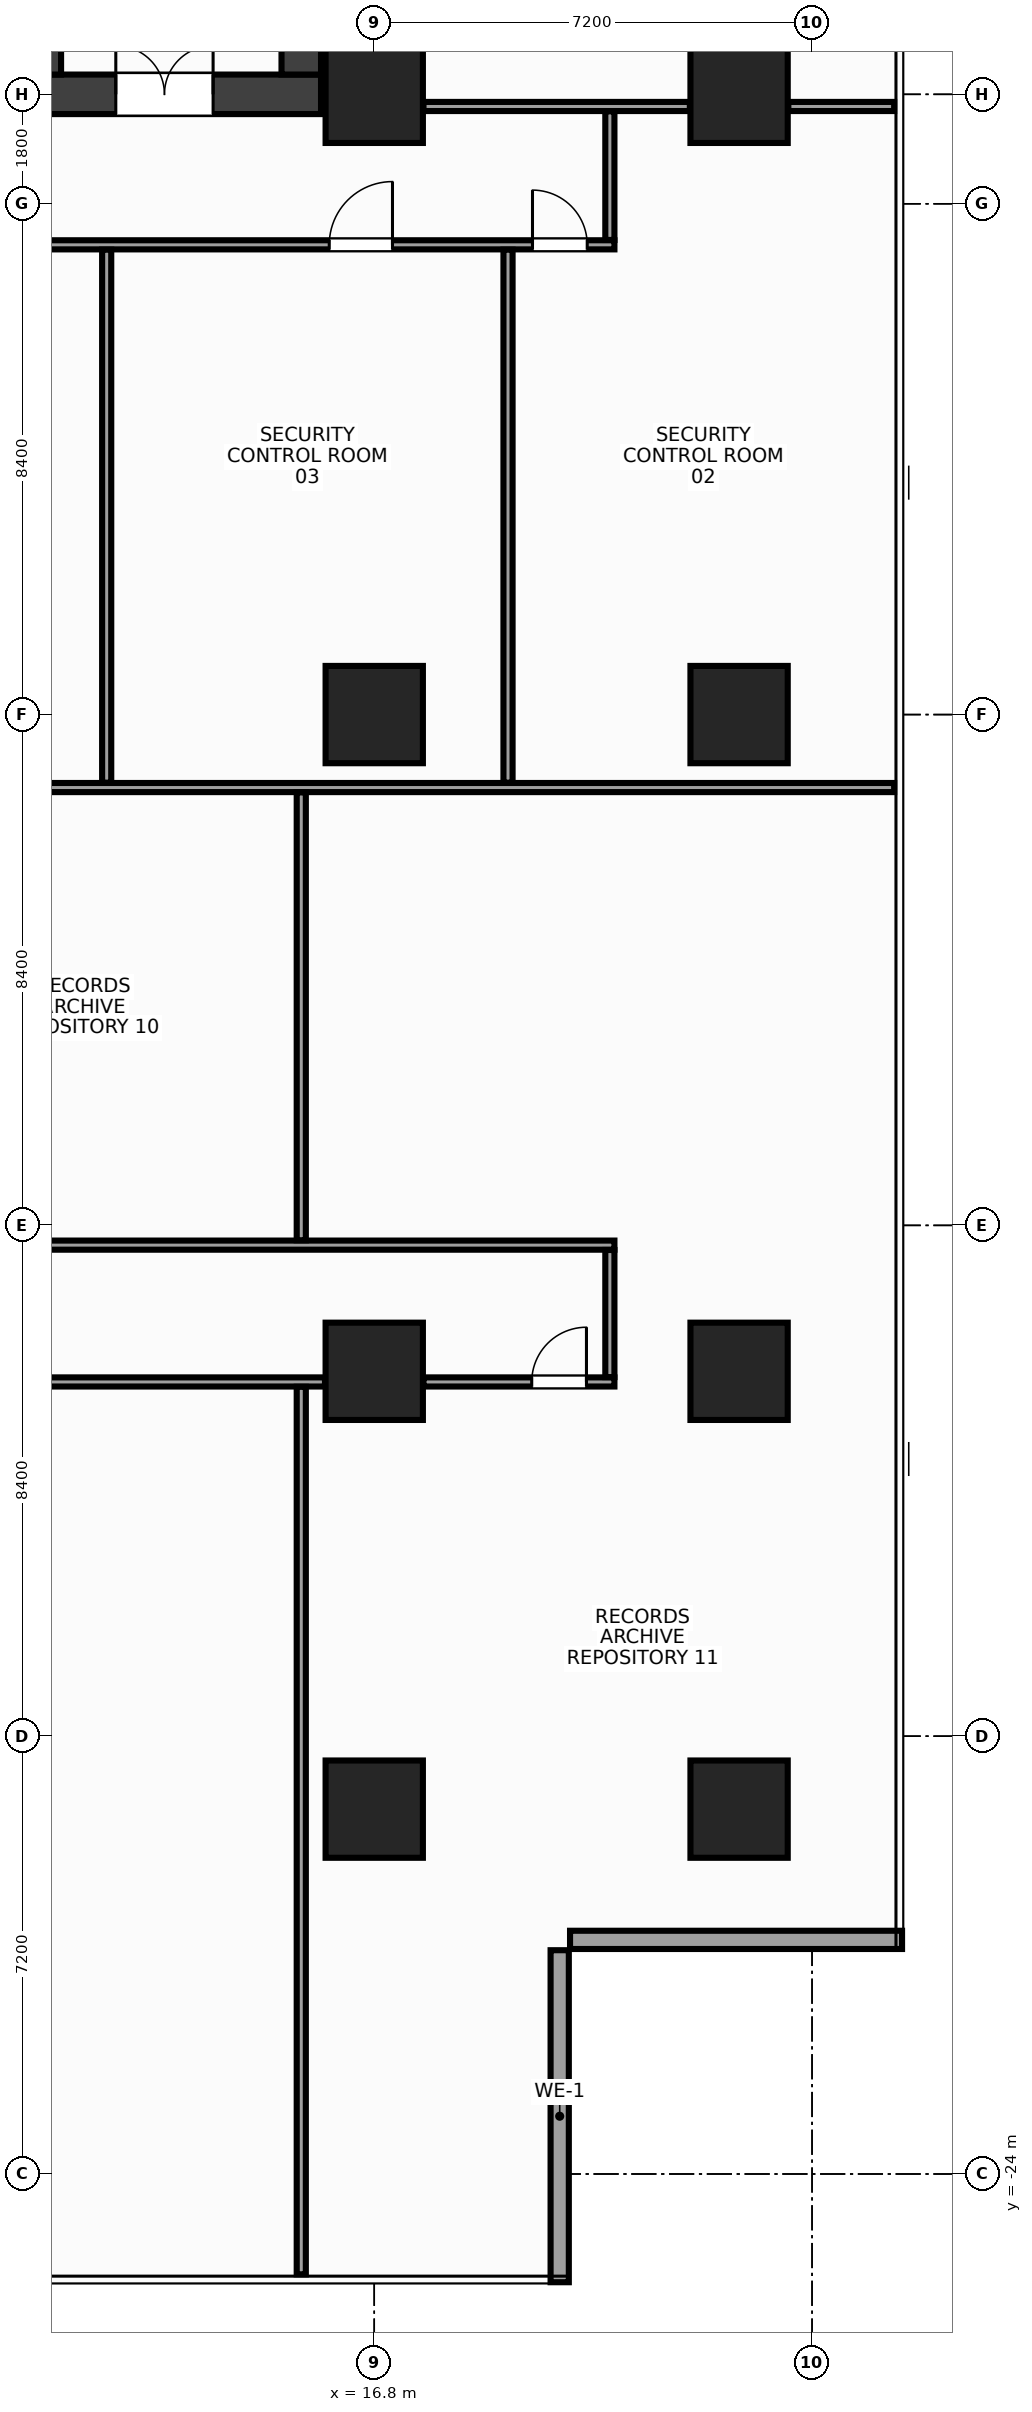
"""IFC4 building model, lengths in metres.
Left out: names, types, materials, properties, quantities, classifications, styles, units other than length and angle.
Written with IfcOpenShell. Run it as: python <this file> out.ifc"""

import sys

from ifc_helpers import new_model, si_unit, direction, frame, frame_2d, origin, origin_2d, place, context, subcontext, project, spatial, rectangle, extrude, source, transform, mapped, element, fill, save


model = new_model("IFC4")
c1 = context("Model", 3, precision=1e-05, world=origin(), true_north=direction((0.0, 1.0)))
c2 = subcontext(c1, "Body", "Model", "MODEL_VIEW")
j1 = project(units=[si_unit("LENGTHUNIT", "METRE"), si_unit("PLANEANGLEUNIT", "RADIAN")], contexts=[c1])
p1 = place(None, origin())
s1 = spatial("IfcSite", under=j1, at=p1, CompositionType="ELEMENT")
p2 = place(p1, origin())
s2 = spatial("IfcBuilding", under=s1, at=p2, CompositionType="ELEMENT")
p3 = place(p2, frame((0.0, 0.0, 99.2)))
s3 = spatial("IfcBuildingStorey", under=s2, at=p3, CompositionType="ELEMENT", Elevation=99.2)
m1 = source(origin(), c2, "Body", "SweptSolid", [
    extrude(rectangle(XDim=31.85, YDim=0.65, at=frame_2d((15.925, 0.0))), origin(), (0.0, 0.0, 1.0), 3.6),
])
p4 = place(p3, frame((-15.925, 10.2, 0.0), z_axis=(0.0, 0.0, 1.0), x_axis=(1.0, 0.0, 0.0)))
e1 = element("IfcWall", 1, at=p4, inside=s3, PredefinedType="SHEAR", context=c2, shape_type="MappedRepresentation", body=[
    mapped(m1, transform((0.0, 0.0, 0.0), x_axis=(1.0, 0.0, 0.0), y_axis=(0.0, 1.0, 0.0), z_axis=(0.0, 0.0, 1.0), scale=1.0)),
])
p5 = place(p4, frame((1.775, 0.0, 0.0)))
e2 = element("IfcOpeningElement", 2, at=p5, cuts=e1, PredefinedType="OPENING", context=c2, shape_type="SweptSolid", body=[
    extrude(rectangle(XDim=1.6, YDim=2.15, at=frame_2d((0.8, 1.075))), frame((0.0, 0.337, 0.0), z_axis=(0.0, -1.0, 0.0), x_axis=(1.0, 0.0, 0.0)), (0.0, 0.0, 1.0), 0.674),
])
p6 = place(p4, frame((28.475, 0.0, 0.0)))
e3 = element("IfcOpeningElement", 3, at=p6, cuts=e1, PredefinedType="OPENING", context=c2, shape_type="SweptSolid", body=[
    extrude(rectangle(XDim=1.6, YDim=2.15, at=frame_2d((0.8, 1.075))), frame((0.0, 0.337, 0.0), z_axis=(0.0, -1.0, 0.0), x_axis=(1.0, 0.0, 0.0)), (0.0, 0.0, 1.0), 0.674),
])
p7 = place(p4, frame((15.175, 0.0, 0.0)))
e4 = element("IfcOpeningElement", 4, at=p7, cuts=e1, PredefinedType="OPENING", context=c2, shape_type="SweptSolid", body=[
    extrude(rectangle(XDim=1.5, YDim=2.2, at=frame_2d((0.75, 1.1))), frame((0.0, 0.337, 0.0), z_axis=(0.0, -1.0, 0.0), x_axis=(1.0, 0.0, 0.0)), (0.0, 0.0, 1.0), 0.674),
])
m2 = source(origin(), c2, "Body", "SweptSolid", [
    extrude(rectangle(XDim=12.95, YDim=0.65, at=frame_2d((6.475, 0.0))), origin(), (0.0, 0.0, 1.0), 3.6),
])
p8 = place(p3, frame((15.6, 10.525, 0.0), z_axis=(0.0, 0.0, 1.0), x_axis=(0.0, 1.0, 0.0)))
e5 = element("IfcWall", 5, at=p8, inside=s3, PredefinedType="SHEAR", context=c2, shape_type="MappedRepresentation", body=[
    mapped(m2, transform((0.0, 0.0, 0.0), x_axis=(1.0, 0.0, 0.0), y_axis=(0.0, 1.0, 0.0), z_axis=(0.0, 0.0, 1.0), scale=1.0)),
])
m3 = source(origin(), c2, "Body", "SweptSolid", [
    extrude(rectangle(XDim=3.125, YDim=0.2, at=frame_2d((1.562, 0.0))), origin(), (0.0, 0.0, 1.0), 3.6),
])
p9 = place(p3, frame((11.55, 10.525, 0.0), z_axis=(0.0, 0.0, 1.0), x_axis=(0.0, 1.0, 0.0)))
e6 = element("IfcWall", 6, at=p9, inside=s3, PredefinedType="SHEAR", context=c2, shape_type="MappedRepresentation", body=[
    mapped(m3, transform((0.0, 0.0, 0.0), x_axis=(1.0, 0.0, 0.0), y_axis=(0.0, 1.0, 0.0), z_axis=(0.0, 0.0, 1.0), scale=1.0)),
])
p10 = place(p9, frame((0.9, 0.0, 0.0)))
e7 = element("IfcOpeningElement", 7, at=p10, cuts=e6, PredefinedType="OPENING", context=c2, shape_type="SweptSolid", body=[
    extrude(rectangle(XDim=1.1, YDim=2.15, at=frame_2d((0.55, 1.075))), frame((0.0, 0.112, 0.0), z_axis=(0.0, -1.0, 0.0), x_axis=(1.0, 0.0, 0.0)), (0.0, 0.0, 1.0), 0.224),
])
m4 = source(origin(), c2, "Body", "SweptSolid", [
    extrude(rectangle(XDim=1.6, YDim=1.6, at=origin_2d()), origin(), (0.0, 0.0, 1.0), 3.6),
])
for number, where, z_axis, x_axis in (
    (8, (16.8, -18.0, 0.0), (0.0, 0.0, 1.0), (1.0, 0.0, 0.0)),
    (9, (16.8, -10.8, 0.0), (0.0, 0.0, 1.0), (1.0, 0.0, 0.0)),
    (10, (16.8, 0.0, 0.0), (0.0, 0.0, 1.0), (1.0, 0.0, 0.0)),
    (11, (16.8, 10.2, 0.0), (0.0, 0.0, 1.0), (1.0, 0.0, 0.0)),
    (12, (22.8, -18.0, 0.0), (0.0, 0.0, 1.0), (1.0, 0.0, 0.0)),
    (13, (22.8, -10.8, 0.0), (0.0, 0.0, 1.0), (1.0, 0.0, 0.0)),
    (14, (22.8, 0.0, 0.0), (0.0, 0.0, 1.0), (1.0, 0.0, 0.0)),
    (15, (22.8, 10.2, 0.0), (0.0, 0.0, 1.0), (1.0, 0.0, 0.0)),
):
    element("IfcColumn", number, at=place(p3, frame(where, z_axis=z_axis, x_axis=x_axis)), inside=s3, PredefinedType="COLUMN", context=c2, shape_type="MappedRepresentation", body=[
        mapped(m4, transform((0.0, 0.0, 0.0), x_axis=(1.0, 0.0, 0.0), y_axis=(0.0, 1.0, 0.0), z_axis=(0.0, 0.0, 1.0), scale=1.0)),
    ])
m5 = source(origin(), c2, "Body", "SweptSolid", [
    extrude(rectangle(XDim=5.46, YDim=0.3, at=frame_2d((2.73, 0.0))), origin(), (0.0, 0.0, 1.0), 2.74),
])
for number, where, z_axis, x_axis in (
    (16, (19.85, -25.78, 0.0), (0.0, 0.0, 1.0), (0.0, 1.0, 0.0)),
    (17, (20.02, -20.15, 0.0), (0.0, 0.0, 1.0), (1.0, 0.0, 0.0)),
):
    element("IfcWall", number, at=place(p3, frame(where, z_axis=z_axis, x_axis=x_axis)), inside=s3, PredefinedType="STANDARD", context=c2, shape_type="MappedRepresentation", body=[
        mapped(m5, transform((0.0, 0.0, 0.0), x_axis=(1.0, 0.0, 0.0), y_axis=(0.0, 1.0, 0.0), z_axis=(0.0, 0.0, 1.0), scale=1.0)),
    ])
m6 = source(origin(), c2, "Body", "SweptSolid", [
    extrude(rectangle(XDim=4.38, YDim=0.15, at=frame_2d((2.19, 0.0))), origin(), (0.0, 0.0, 1.0), 2.745),
])
p11 = place(p3, frame((17.61, 10.0, 0.0), z_axis=(0.0, 0.0, 1.0), x_axis=(1.0, 0.0, 0.0)))
e18 = element("IfcWall", 18, at=p11, inside=s3, PredefinedType="PARTITIONING", context=c2, shape_type="MappedRepresentation", body=[
    mapped(m6, transform((0.0, 0.0, 0.0), x_axis=(1.0, 0.0, 0.0), y_axis=(0.0, 1.0, 0.0), z_axis=(0.0, 0.0, 1.0), scale=1.0)),
])
m7 = source(origin(), c2, "Body", "SweptSolid", [
    extrude(rectangle(XDim=1.74, YDim=0.15, at=frame_2d((0.87, 0.0))), origin(), (0.0, 0.0, 1.0), 3.36),
])
p12 = place(p3, frame((23.61, 10.0, 0.0), z_axis=(0.0, 0.0, 1.0), x_axis=(1.0, 0.0, 0.0)))
e19 = element("IfcWall", 19, at=p12, inside=s3, PredefinedType="PARTITIONING", context=c2, shape_type="MappedRepresentation", body=[
    mapped(m7, transform((0.0, 0.0, 0.0), x_axis=(1.0, 0.0, 0.0), y_axis=(0.0, 1.0, 0.0), z_axis=(0.0, 0.0, 1.0), scale=1.0)),
])
m8 = source(origin(), c2, "Body", "SweptSolid", [
    extrude(rectangle(XDim=22.3, YDim=0.15, at=frame_2d((11.15, 0.0))), origin(), (0.0, 0.0, 1.0), 2.745),
])
p13 = place(p3, frame((-1.55, 7.725, 0.0), z_axis=(0.0, 0.0, 1.0), x_axis=(1.0, 0.0, 0.0)))
e20 = element("IfcWall", 20, at=p13, inside=s3, PredefinedType="PARTITIONING", context=c2, shape_type="MappedRepresentation", body=[
    mapped(m8, transform((0.0, 0.0, 0.0), x_axis=(1.0, 0.0, 0.0), y_axis=(0.0, 1.0, 0.0), z_axis=(0.0, 0.0, 1.0), scale=1.0)),
])
p14 = place(p13, frame((20.952, 0.0, 0.0)))
e21 = element("IfcOpeningElement", 21, at=p14, cuts=e20, PredefinedType="OPENING", context=c2, shape_type="SweptSolid", body=[
    extrude(rectangle(XDim=0.9, YDim=2.15, at=frame_2d((0.45, 1.075))), frame((0.0, 0.087, 0.0), z_axis=(0.0, -1.0, 0.0), x_axis=(1.0, 0.0, 0.0)), (0.0, 0.0, 1.0), 0.174),
])
p15 = place(p13, frame((17.61, 0.0, 0.0)))
e22 = element("IfcOpeningElement", 22, at=p15, cuts=e20, PredefinedType="OPENING", context=c2, shape_type="SweptSolid", body=[
    extrude(rectangle(XDim=1.04, YDim=2.2, at=frame_2d((0.52, 1.1))), frame((0.0, 0.087, 0.0), z_axis=(0.0, -1.0, 0.0), x_axis=(1.0, 0.0, 0.0)), (0.0, 0.0, 1.0), 0.174),
])
p16 = place(p13, frame((2.677, 0.0, 0.0)))
e23 = element("IfcOpeningElement", 23, at=p16, cuts=e20, PredefinedType="OPENING", context=c2, shape_type="SweptSolid", body=[
    extrude(rectangle(XDim=1.04, YDim=2.2, at=frame_2d((0.52, 1.1))), frame((0.0, 0.087, 0.0), z_axis=(0.0, -1.0, 0.0), x_axis=(1.0, 0.0, 0.0)), (0.0, 0.0, 1.0), 0.174),
])
p17 = place(p13, frame((9.63, 0.0, 0.0)))
e24 = element("IfcOpeningElement", 24, at=p17, cuts=e20, PredefinedType="OPENING", context=c2, shape_type="SweptSolid", body=[
    extrude(rectangle(XDim=1.04, YDim=2.2, at=frame_2d((0.52, 1.1))), frame((0.0, 0.087, 0.0), z_axis=(0.0, -1.0, 0.0), x_axis=(1.0, 0.0, 0.0)), (0.0, 0.0, 1.0), 0.174),
])
p18 = place(p3, frame((-1.55, -8.725, 0.0), z_axis=(0.0, 0.0, 1.0), x_axis=(1.0, 0.0, 0.0)))
e25 = element("IfcWall", 25, at=p18, inside=s3, PredefinedType="PARTITIONING", context=c2, shape_type="MappedRepresentation", body=[
    mapped(m8, transform((0.0, 0.0, 0.0), x_axis=(1.0, 0.0, 0.0), y_axis=(0.0, 1.0, 0.0), z_axis=(0.0, 0.0, 1.0), scale=1.0)),
])
p19 = place(p18, frame((1.897, 0.0, 0.0)))
e26 = element("IfcOpeningElement", 26, at=p19, cuts=e25, PredefinedType="OPENING", context=c2, shape_type="SweptSolid", body=[
    extrude(rectangle(XDim=1.04, YDim=2.2, at=frame_2d((0.52, 1.1))), frame((0.0, 0.087, 0.0), z_axis=(0.0, -1.0, 0.0), x_axis=(1.0, 0.0, 0.0)), (0.0, 0.0, 1.0), 0.174),
])
p20 = place(p18, frame((10.23, 0.0, 0.0)))
e27 = element("IfcOpeningElement", 27, at=p20, cuts=e25, PredefinedType="OPENING", context=c2, shape_type="SweptSolid", body=[
    extrude(rectangle(XDim=1.04, YDim=2.2, at=frame_2d((0.52, 1.1))), frame((0.0, 0.087, 0.0), z_axis=(0.0, -1.0, 0.0), x_axis=(1.0, 0.0, 0.0)), (0.0, 0.0, 1.0), 0.174),
])
m9 = source(origin(), c2, "Body", "SweptSolid", [
    extrude(rectangle(XDim=7.08, YDim=0.15, at=frame_2d((3.54, 0.0))), origin(), (0.0, 0.0, 1.0), 2.745),
])
p21 = place(p3, frame((8.91, -10.975, 0.0), z_axis=(0.0, 0.0, 1.0), x_axis=(1.0, 0.0, 0.0)))
e28 = element("IfcWall", 28, at=p21, inside=s3, PredefinedType="PARTITIONING", context=c2, shape_type="MappedRepresentation", body=[
    mapped(m9, transform((0.0, 0.0, 0.0), x_axis=(1.0, 0.0, 0.0), y_axis=(0.0, 1.0, 0.0), z_axis=(0.0, 0.0, 1.0), scale=1.0)),
])
m10 = source(origin(), c2, "Body", "SweptSolid", [
    extrude(rectangle(XDim=3.14, YDim=0.15, at=frame_2d((1.57, 0.0))), origin(), (0.0, 0.0, 1.0), 2.745),
])
p22 = place(p3, frame((17.61, -10.975, 0.0), z_axis=(0.0, 0.0, 1.0), x_axis=(1.0, 0.0, 0.0)))
e29 = element("IfcWall", 29, at=p22, inside=s3, PredefinedType="PARTITIONING", context=c2, shape_type="MappedRepresentation", body=[
    mapped(m10, transform((0.0, 0.0, 0.0), x_axis=(1.0, 0.0, 0.0), y_axis=(0.0, 1.0, 0.0), z_axis=(0.0, 0.0, 1.0), scale=1.0)),
])
p23 = place(p22, frame((1.78, 0.0, 0.0)))
e30 = element("IfcOpeningElement", 30, at=p23, cuts=e29, PredefinedType="OPENING", context=c2, shape_type="SweptSolid", body=[
    extrude(rectangle(XDim=0.9, YDim=2.15, at=frame_2d((0.45, 1.075))), frame((0.0, 0.087, 0.0), z_axis=(0.0, -1.0, 0.0), x_axis=(1.0, 0.0, 0.0)), (0.0, 0.0, 1.0), 0.174),
])
m11 = source(origin(), c2, "Body", "SweptSolid", [
    extrude(rectangle(XDim=2.115, YDim=0.15, at=frame_2d((1.058, 0.0))), origin(), (0.0, 0.0, 1.0), 3.36),
])
p24 = place(p3, frame((20.675, 7.805, 0.0), z_axis=(0.0, 0.0, 1.0), x_axis=(0.0, 1.0, 0.0)))
e31 = element("IfcWall", 31, at=p24, inside=s3, PredefinedType="PARTITIONING", context=c2, shape_type="MappedRepresentation", body=[
    mapped(m11, transform((0.0, 0.0, 0.0), x_axis=(1.0, 0.0, 0.0), y_axis=(0.0, 1.0, 0.0), z_axis=(0.0, 0.0, 1.0), scale=1.0)),
])
m12 = source(origin(), c2, "Body", "SweptSolid", [
    extrude(rectangle(XDim=2.09, YDim=0.15, at=frame_2d((1.045, 0.0))), origin(), (0.0, 0.0, 1.0), 3.36),
])
p25 = place(p3, frame((20.675, -10.895, 0.0), z_axis=(0.0, 0.0, 1.0), x_axis=(0.0, 1.0, 0.0)))
e32 = element("IfcWall", 32, at=p25, inside=s3, PredefinedType="PARTITIONING", context=c2, shape_type="MappedRepresentation", body=[
    mapped(m12, transform((0.0, 0.0, 0.0), x_axis=(1.0, 0.0, 0.0), y_axis=(0.0, 1.0, 0.0), z_axis=(0.0, 0.0, 1.0), scale=1.0)),
])
m13 = source(origin(), c2, "Body", "SweptSolid", [
    extrude(rectangle(XDim=26.895, YDim=0.15, at=frame_2d((13.448, 0.0))), origin(), (0.0, 0.0, 1.0), 2.745),
])
p26 = place(p3, frame((-1.545, -1.2, 0.0), z_axis=(0.0, 0.0, 1.0), x_axis=(1.0, 0.0, 0.0)))
e33 = element("IfcWall", 33, at=p26, inside=s3, PredefinedType="PARTITIONING", context=c2, shape_type="MappedRepresentation", body=[
    mapped(m13, transform((0.0, 0.0, 0.0), x_axis=(1.0, 0.0, 0.0), y_axis=(0.0, 1.0, 0.0), z_axis=(0.0, 0.0, 1.0), scale=1.0)),
])
m14 = source(origin(), c2, "Body", "SweptSolid", [
    extrude(rectangle(XDim=8.765, YDim=0.15, at=frame_2d((4.383, 0.0))), origin(), (0.0, 0.0, 1.0), 2.645),
])
p27 = place(p3, frame((12.4, -1.12, 0.0), z_axis=(0.0, 0.0, 1.0), x_axis=(0.0, 1.0, 0.0)))
e34 = element("IfcWall", 34, at=p27, inside=s3, PredefinedType="PARTITIONING", context=c2, shape_type="MappedRepresentation", body=[
    mapped(m14, transform((0.0, 0.0, 0.0), x_axis=(1.0, 0.0, 0.0), y_axis=(0.0, 1.0, 0.0), z_axis=(0.0, 0.0, 1.0), scale=1.0)),
])
m15 = source(origin(), c2, "Body", "SweptSolid", [
    extrude(rectangle(XDim=8.765, YDim=0.15, at=frame_2d((4.383, 0.0))), origin(), (0.0, 0.0, 1.0), 2.745),
])
p28 = place(p3, frame((19.0, -1.12, 0.0), z_axis=(0.0, 0.0, 1.0), x_axis=(0.0, 1.0, 0.0)))
e35 = element("IfcWall", 35, at=p28, inside=s3, PredefinedType="PARTITIONING", context=c2, shape_type="MappedRepresentation", body=[
    mapped(m15, transform((0.0, 0.0, 0.0), x_axis=(1.0, 0.0, 0.0), y_axis=(0.0, 1.0, 0.0), z_axis=(0.0, 0.0, 1.0), scale=1.0)),
])
m16 = source(origin(), c2, "Body", "SweptSolid", [
    extrude(rectangle(XDim=14.595, YDim=0.15, at=frame_2d((7.297, 0.0))), origin(), (0.0, 0.0, 1.0), 2.745),
])
p29 = place(p3, frame((15.6, -25.65, 0.0), z_axis=(0.0, 0.0, 1.0), x_axis=(0.0, 1.0, 0.0)))
e36 = element("IfcWall", 36, at=p29, inside=s3, PredefinedType="PARTITIONING", context=c2, shape_type="MappedRepresentation", body=[
    mapped(m16, transform((0.0, 0.0, 0.0), x_axis=(1.0, 0.0, 0.0), y_axis=(0.0, 1.0, 0.0), z_axis=(0.0, 0.0, 1.0), scale=1.0)),
])
m17 = source(origin(), c2, "Body", "SweptSolid", [
    extrude(rectangle(XDim=7.365, YDim=0.15, at=frame_2d((3.683, 0.0))), origin(), (0.0, 0.0, 1.0), 3.36),
])
p30 = place(p3, frame((15.6, -8.645, 0.0), z_axis=(0.0, 0.0, 1.0), x_axis=(0.0, 1.0, 0.0)))
e37 = element("IfcWall", 37, at=p30, inside=s3, PredefinedType="PARTITIONING", context=c2, shape_type="MappedRepresentation", body=[
    mapped(m17, transform((0.0, 0.0, 0.0), x_axis=(1.0, 0.0, 0.0), y_axis=(0.0, 1.0, 0.0), z_axis=(0.0, 0.0, 1.0), scale=1.0)),
])
m18 = source(origin(), c2, "Body", "SweptSolid", [
    extrude(rectangle(XDim=1.6, YDim=2.15, at=frame_2d((0.8, 1.075))), frame((0.0, 0.025, 0.0), z_axis=(0.0, -1.0, 0.0), x_axis=(1.0, 0.0, 0.0)), (0.0, 0.0, 1.0), 0.05),
])
p31 = place(p6, origin())
e38 = element("IfcDoor", 38, at=p31, inside=s3, OperationType="DOUBLE_DOOR_SINGLE_SWING", PredefinedType="DOOR", context=c2, shape_type="MappedRepresentation", body=[
    mapped(m18, transform((0.0, 0.0, 0.0), x_axis=(1.0, 0.0, 0.0), y_axis=(0.0, 1.0, 0.0), z_axis=(0.0, 0.0, 1.0), scale=1.0)),
])
fill(e3, e38)
m19 = source(origin(), c2, "Body", "SweptSolid", [
    extrude(rectangle(XDim=0.9, YDim=2.15, at=frame_2d((0.45, 1.075))), frame((0.0, 0.025, 0.0), z_axis=(0.0, -1.0, 0.0), x_axis=(1.0, 0.0, 0.0)), (0.0, 0.0, 1.0), 0.05),
])
p32 = place(p14, origin())
e39 = element("IfcDoor", 39, at=p32, inside=s3, OperationType="SINGLE_SWING_LEFT", PredefinedType="DOOR", context=c2, shape_type="MappedRepresentation", body=[
    mapped(m19, transform((0.0, 0.0, 0.0), x_axis=(1.0, 0.0, 0.0), y_axis=(0.0, 1.0, 0.0), z_axis=(0.0, 0.0, 1.0), scale=1.0)),
])
fill(e21, e39)
m20 = source(origin(), c2, "Body", "SweptSolid", [
    extrude(rectangle(XDim=1.04, YDim=2.2, at=frame_2d((0.52, 1.1))), frame((0.0, 0.025, 0.0), z_axis=(0.0, -1.0, 0.0), x_axis=(1.0, 0.0, 0.0)), (0.0, 0.0, 1.0), 0.05),
])
p33 = place(p15, origin())
e40 = element("IfcDoor", 40, at=p33, inside=s3, OperationType="SINGLE_SWING_RIGHT", PredefinedType="DOOR", context=c2, shape_type="MappedRepresentation", body=[
    mapped(m20, transform((0.0, 0.0, 0.0), x_axis=(1.0, 0.0, 0.0), y_axis=(0.0, 1.0, 0.0), z_axis=(0.0, 0.0, 1.0), scale=1.0)),
])
fill(e22, e40)
p34 = place(p23, origin())
e41 = element("IfcDoor", 41, at=p34, inside=s3, OperationType="SINGLE_SWING_RIGHT", PredefinedType="DOOR", context=c2, shape_type="MappedRepresentation", body=[
    mapped(m19, transform((0.0, 0.0, 0.0), x_axis=(1.0, 0.0, 0.0), y_axis=(0.0, 1.0, 0.0), z_axis=(0.0, 0.0, 1.0), scale=1.0)),
])
fill(e30, e41)
save(model, sys.argv[1])
